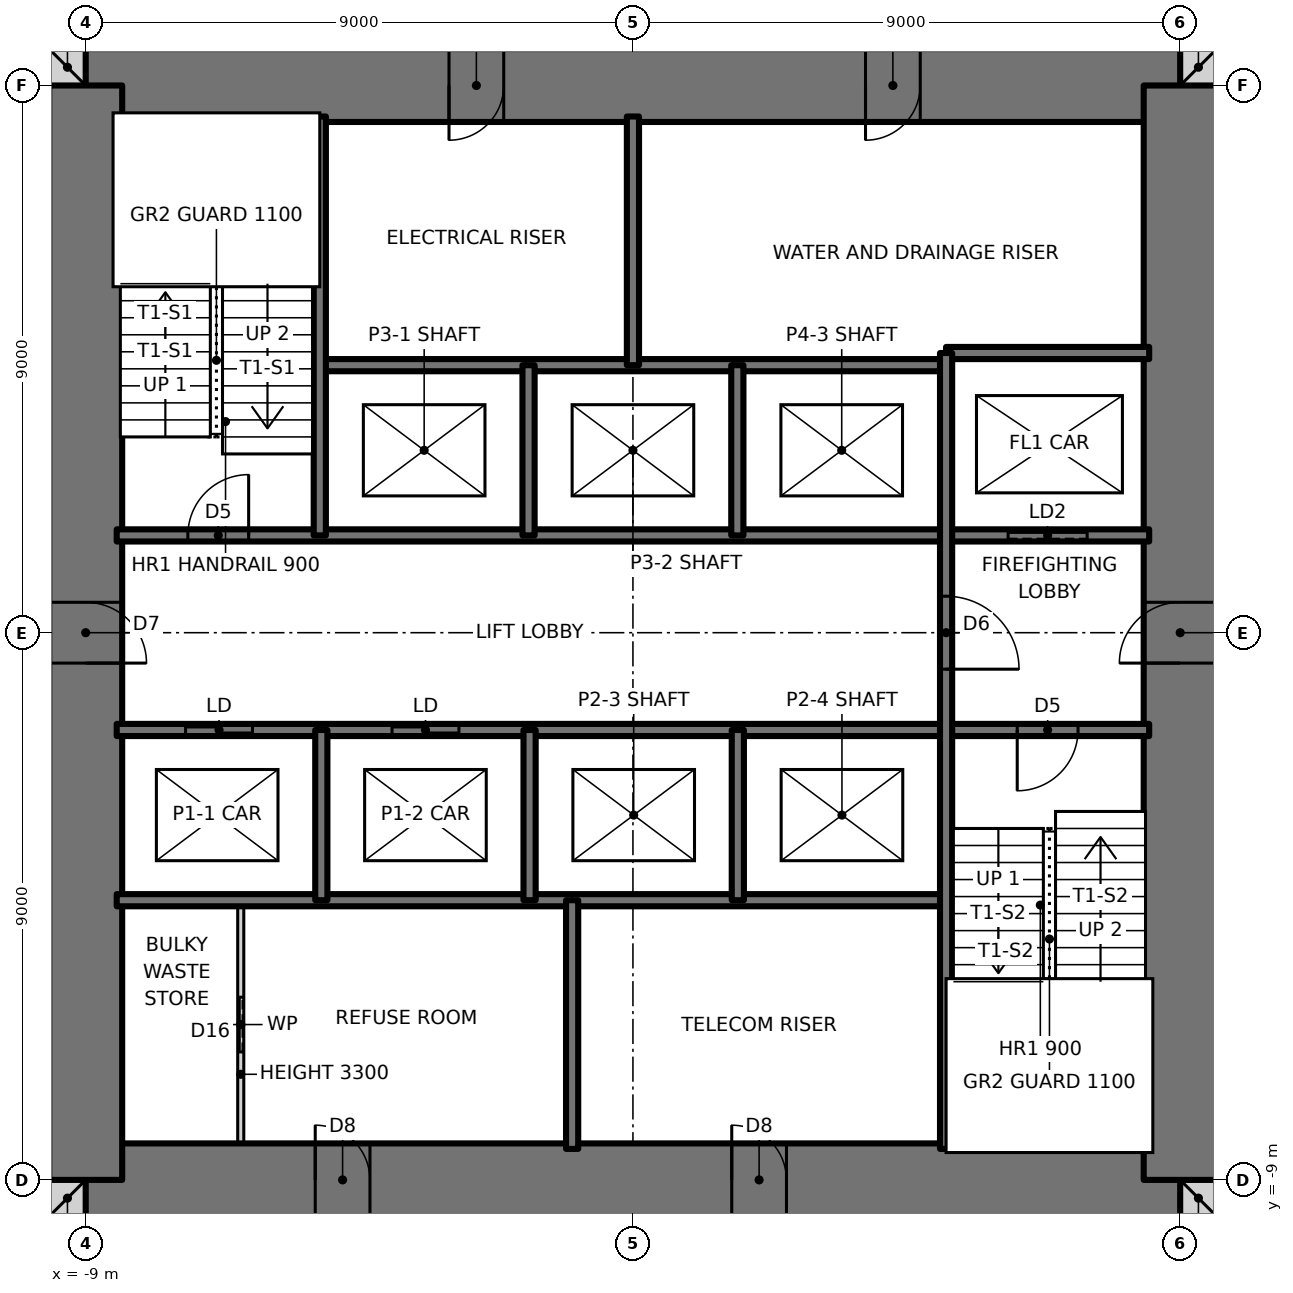
"""IFC4 building model, lengths in metres.
Left out: names, types, materials, properties, quantities, classifications, styles, units other than length and angle.
Written with IfcOpenShell. Run it as: python <this file> out.ifc"""

import sys

from ifc_helpers import new_model, si_unit, direction, frame, frame_2d, origin, place, context, subcontext, project, spatial, rectangle, extrude, element, fill, save


model = new_model("IFC4")
c1 = context("Model", 3, precision=1e-05, world=origin(), true_north=direction((0.0, 1.0)))
c2 = subcontext(c1, "Body", "Model", "MODEL_VIEW")
j1 = project(units=[si_unit("LENGTHUNIT", "METRE"), si_unit("PLANEANGLEUNIT", "RADIAN")], contexts=[c1])
p1 = place(None, origin())
s1 = spatial("IfcSite", under=j1, at=p1, CompositionType="ELEMENT")
p2 = place(p1, origin())
s2 = spatial("IfcBuilding", under=s1, at=p2, CompositionType="ELEMENT")
p3 = place(p2, frame((0.0, 0.0, 71.0)))
s3 = spatial("IfcBuildingStorey", under=s2, at=p3, CompositionType="ELEMENT", Elevation=71.0)
for number, where, z_axis, x_axis in (
    (1, (-9.6, -9.3, 0.0), (0.0, 0.0, 1.0), (1.0, 0.0, 0.0)),
    (2, (9.0, -9.3, 0.0), (0.0, 0.0, 1.0), (1.0, 0.0, 0.0)),
    (3, (9.0, 9.3, 0.0), (0.0, 0.0, 1.0), (1.0, 0.0, 0.0)),
    (4, (-9.6, 9.3, 0.0), (0.0, 0.0, 1.0), (1.0, 0.0, 0.0)),
):
    element("IfcWall", number, at=place(p3, frame(where, z_axis=z_axis, x_axis=x_axis)), inside=s3, PredefinedType="SOLIDWALL", context=c2, shape_type="SweptSolid", body=[
        extrude(rectangle(XDim=0.6, YDim=0.6, at=frame_2d((0.3, 0.0))), origin(), (0.0, 0.0, 1.0), 3.5),
    ])
p4 = place(p3, frame((-9.0, -9.0, 0.0), z_axis=(0.0, 0.0, 1.0), x_axis=(1.0, 0.0, 0.0)))
e5 = element("IfcWall", 5, at=p4, inside=s3, PredefinedType="SHEAR", context=c2, shape_type="SweptSolid", body=[
    extrude(rectangle(XDim=18.0, YDim=1.2, at=frame_2d((9.0, 0.0))), origin(), (0.0, 0.0, 1.0), 3.5),
])
p5 = place(p4, frame((3.775, 0.0, 0.0)))
e6 = element("IfcOpeningElement", 6, at=p5, cuts=e5, PredefinedType="OPENING", context=c2, shape_type="SweptSolid", body=[
    extrude(rectangle(XDim=0.9, YDim=2.1, at=frame_2d((0.45, 1.05))), frame((0.0, 0.61, 0.0), z_axis=(0.0, -1.0, 0.0), x_axis=(1.0, 0.0, 0.0)), (0.0, 0.0, 1.0), 1.22),
])
p6 = place(p4, frame((10.625, 0.0, 0.0)))
e7 = element("IfcOpeningElement", 7, at=p6, cuts=e5, PredefinedType="OPENING", context=c2, shape_type="SweptSolid", body=[
    extrude(rectangle(XDim=0.9, YDim=2.1, at=frame_2d((0.45, 1.05))), frame((0.0, 0.61, 0.0), z_axis=(0.0, -1.0, 0.0), x_axis=(1.0, 0.0, 0.0)), (0.0, 0.0, 1.0), 1.22),
])
p7 = place(p3, frame((9.0, 9.0, 0.0), z_axis=(0.0, 0.0, 1.0), x_axis=(-1.0, 0.0, 0.0)))
e8 = element("IfcWall", 8, at=p7, inside=s3, PredefinedType="SHEAR", context=c2, shape_type="SweptSolid", body=[
    extrude(rectangle(XDim=18.0, YDim=1.2, at=frame_2d((9.0, 0.0))), origin(), (0.0, 0.0, 1.0), 3.5),
])
p8 = place(p7, frame((11.125, 0.0, 0.0)))
e9 = element("IfcOpeningElement", 9, at=p8, cuts=e8, PredefinedType="OPENING", context=c2, shape_type="SweptSolid", body=[
    extrude(rectangle(XDim=0.9, YDim=2.1, at=frame_2d((0.45, 1.05))), frame((0.0, 0.61, 0.0), z_axis=(0.0, -1.0, 0.0), x_axis=(1.0, 0.0, 0.0)), (0.0, 0.0, 1.0), 1.22),
])
p9 = place(p7, frame((4.275, 0.0, 0.0)))
e10 = element("IfcOpeningElement", 10, at=p9, cuts=e8, PredefinedType="OPENING", context=c2, shape_type="SweptSolid", body=[
    extrude(rectangle(XDim=0.9, YDim=2.1, at=frame_2d((0.45, 1.05))), frame((0.0, 0.61, 0.0), z_axis=(0.0, -1.0, 0.0), x_axis=(1.0, 0.0, 0.0)), (0.0, 0.0, 1.0), 1.22),
])
p10 = place(p3, frame((9.0, -9.0, 0.0), z_axis=(0.0, 0.0, 1.0), x_axis=(0.0, 1.0, 0.0)))
e11 = element("IfcWall", 11, at=p10, inside=s3, PredefinedType="SHEAR", context=c2, shape_type="SweptSolid", body=[
    extrude(rectangle(XDim=18.0, YDim=1.2, at=frame_2d((9.0, 0.0))), origin(), (0.0, 0.0, 1.0), 3.5),
])
p11 = place(p10, frame((8.5, 0.0, 0.0)))
e12 = element("IfcOpeningElement", 12, at=p11, cuts=e11, PredefinedType="OPENING", context=c2, shape_type="SweptSolid", body=[
    extrude(rectangle(XDim=1.0, YDim=2.1, at=frame_2d((0.5, 1.05))), frame((0.0, 0.61, 0.0), z_axis=(0.0, -1.0, 0.0), x_axis=(1.0, 0.0, 0.0)), (0.0, 0.0, 1.0), 1.22),
])
p12 = place(p3, frame((-9.0, 9.0, 0.0), z_axis=(0.0, 0.0, 1.0), x_axis=(0.0, -1.0, 0.0)))
e13 = element("IfcWall", 13, at=p12, inside=s3, PredefinedType="SHEAR", context=c2, shape_type="SweptSolid", body=[
    extrude(rectangle(XDim=18.0, YDim=1.2, at=frame_2d((9.0, 0.0))), origin(), (0.0, 0.0, 1.0), 3.5),
])
p13 = place(p12, frame((8.5, 0.0, 0.0)))
e14 = element("IfcOpeningElement", 14, at=p13, cuts=e13, PredefinedType="OPENING", context=c2, shape_type="SweptSolid", body=[
    extrude(rectangle(XDim=1.0, YDim=2.1, at=frame_2d((0.5, 1.05))), frame((0.0, 0.61, 0.0), z_axis=(0.0, -1.0, 0.0), x_axis=(1.0, 0.0, 0.0)), (0.0, 0.0, 1.0), 1.22),
])
p14 = place(p3, frame((-8.49, -4.4, 0.0), z_axis=(0.0, 0.0, 1.0), x_axis=(1.0, 0.0, 0.0)))
e15 = element("IfcWall", 15, at=p14, inside=s3, PredefinedType="SOLIDWALL", context=c2, shape_type="SweptSolid", body=[
    extrude(rectangle(XDim=13.64, YDim=0.2, at=frame_2d((6.82, 0.0))), origin(), (0.0, 0.0, 1.0), 3.5),
])
p15 = place(p3, frame((-8.49, -1.6, 0.0), z_axis=(0.0, 0.0, 1.0), x_axis=(1.0, 0.0, 0.0)))
e16 = element("IfcWall", 16, at=p15, inside=s3, PredefinedType="SOLIDWALL", context=c2, shape_type="SweptSolid", body=[
    extrude(rectangle(XDim=16.98, YDim=0.2, at=frame_2d((8.49, 0.0))), origin(), (0.0, 0.0, 1.0), 3.5),
])
p16 = place(p15, frame((14.81, 0.0, 0.0)))
e17 = element("IfcOpeningElement", 17, at=p16, cuts=e16, PredefinedType="OPENING", context=c2, shape_type="SweptSolid", body=[
    extrude(rectangle(XDim=1.0, YDim=2.1, at=frame_2d((0.5, 1.05))), frame((0.0, 0.11, 0.0), z_axis=(0.0, -1.0, 0.0), x_axis=(1.0, 0.0, 0.0)), (0.0, 0.0, 1.0), 0.22),
])
p17 = place(p15, frame((1.133, 0.0, 0.0)))
e18 = element("IfcOpeningElement", 18, at=p17, cuts=e16, PredefinedType="OPENING", context=c2, shape_type="SweptSolid", body=[
    extrude(rectangle(XDim=1.1, YDim=2.1, at=frame_2d((0.55, 1.05))), frame((0.0, 0.11, 0.0), z_axis=(0.0, -1.0, 0.0), x_axis=(1.0, 0.0, 0.0)), (0.0, 0.0, 1.0), 0.22),
])
p18 = place(p15, frame((4.528, 0.0, 0.0)))
e19 = element("IfcOpeningElement", 19, at=p18, cuts=e16, PredefinedType="OPENING", context=c2, shape_type="SweptSolid", body=[
    extrude(rectangle(XDim=1.1, YDim=2.1, at=frame_2d((0.55, 1.05))), frame((0.0, 0.11, 0.0), z_axis=(0.0, -1.0, 0.0), x_axis=(1.0, 0.0, 0.0)), (0.0, 0.0, 1.0), 0.22),
])
p19 = place(p3, frame((-8.49, 1.6, 0.0), z_axis=(0.0, 0.0, 1.0), x_axis=(1.0, 0.0, 0.0)))
e20 = element("IfcWall", 20, at=p19, inside=s3, PredefinedType="SOLIDWALL", context=c2, shape_type="SweptSolid", body=[
    extrude(rectangle(XDim=16.98, YDim=0.2, at=frame_2d((8.49, 0.0))), origin(), (0.0, 0.0, 1.0), 3.5),
])
p20 = place(p19, frame((1.17, 0.0, 0.0)))
e21 = element("IfcOpeningElement", 21, at=p20, cuts=e20, PredefinedType="OPENING", context=c2, shape_type="SweptSolid", body=[
    extrude(rectangle(XDim=1.0, YDim=2.1, at=frame_2d((0.5, 1.05))), frame((0.0, 0.11, 0.0), z_axis=(0.0, -1.0, 0.0), x_axis=(1.0, 0.0, 0.0)), (0.0, 0.0, 1.0), 0.22),
])
p21 = place(p19, frame((14.66, 0.0, 0.0)))
e22 = element("IfcOpeningElement", 22, at=p21, cuts=e20, PredefinedType="OPENING", context=c2, shape_type="SweptSolid", body=[
    extrude(rectangle(XDim=1.3, YDim=2.1, at=frame_2d((0.65, 1.05))), frame((0.0, 0.11, 0.0), z_axis=(0.0, -1.0, 0.0), x_axis=(1.0, 0.0, 0.0)), (0.0, 0.0, 1.0), 0.22),
])
p22 = place(p3, frame((-5.15, 4.4, 0.0), z_axis=(0.0, 0.0, 1.0), x_axis=(1.0, 0.0, 0.0)))
e23 = element("IfcWall", 23, at=p22, inside=s3, PredefinedType="SOLIDWALL", context=c2, shape_type="SweptSolid", body=[
    extrude(rectangle(XDim=10.3, YDim=0.2, at=frame_2d((5.15, 0.0))), origin(), (0.0, 0.0, 1.0), 3.5),
])
p23 = place(p3, frame((5.15, 4.6, 0.0), z_axis=(0.0, 0.0, 1.0), x_axis=(1.0, 0.0, 0.0)))
e24 = element("IfcWall", 24, at=p23, inside=s3, PredefinedType="SOLIDWALL", context=c2, shape_type="SweptSolid", body=[
    extrude(rectangle(XDim=3.34, YDim=0.2, at=frame_2d((1.67, 0.0))), origin(), (0.0, 0.0, 1.0), 3.5),
])
p24 = place(p3, frame((5.15, -8.49, 0.0), z_axis=(0.0, 0.0, 1.0), x_axis=(0.0, 1.0, 0.0)))
e25 = element("IfcWall", 25, at=p24, inside=s3, PredefinedType="SOLIDWALL", context=c2, shape_type="SweptSolid", body=[
    extrude(rectangle(XDim=13.09, YDim=0.2, at=frame_2d((6.545, 0.0))), origin(), (0.0, 0.0, 1.0), 3.5),
])
p25 = place(p24, frame((7.89, 0.0, 0.0)))
e26 = element("IfcOpeningElement", 26, at=p25, cuts=e25, PredefinedType="OPENING", context=c2, shape_type="SweptSolid", body=[
    extrude(rectangle(XDim=1.2, YDim=2.1, at=frame_2d((0.6, 1.05))), frame((0.0, 0.11, 0.0), z_axis=(0.0, -1.0, 0.0), x_axis=(1.0, 0.0, 0.0)), (0.0, 0.0, 1.0), 0.22),
])
for number, where, z_axis, x_axis in (
    (27, (1.725, -4.4, 0.0), (0.0, 0.0, 1.0), (0.0, 1.0, 0.0)),
    (28, (1.717, 1.6, 0.0), (0.0, 0.0, 1.0), (0.0, 1.0, 0.0)),
):
    element("IfcWall", number, at=place(p3, frame(where, z_axis=z_axis, x_axis=x_axis)), inside=s3, PredefinedType="SOLIDWALL", context=c2, shape_type="SweptSolid", body=[
        extrude(rectangle(XDim=2.8, YDim=0.2, at=frame_2d((1.4, 0.0))), origin(), (0.0, 0.0, 1.0), 3.5),
    ])
for number, where, z_axis, x_axis in (
    (29, (0.0, 4.4, 0.0), (0.0, 0.0, 1.0), (0.0, 1.0, 0.0)),
    (30, (-1.0, -8.49, 0.0), (0.0, 0.0, 1.0), (0.0, 1.0, 0.0)),
):
    element("IfcWall", number, at=place(p3, frame(where, z_axis=z_axis, x_axis=x_axis)), inside=s3, PredefinedType="SOLIDWALL", context=c2, shape_type="SweptSolid", body=[
        extrude(rectangle(XDim=4.09, YDim=0.2, at=frame_2d((2.045, 0.0))), origin(), (0.0, 0.0, 1.0), 3.5),
    ])
for number, where, z_axis, x_axis in (
    (31, (-1.7, -4.4, 0.0), (0.0, 0.0, 1.0), (0.0, 1.0, 0.0)),
    (32, (-1.717, 1.6, 0.0), (0.0, 0.0, 1.0), (0.0, 1.0, 0.0)),
    (33, (-5.125, -4.4, 0.0), (0.0, 0.0, 1.0), (0.0, 1.0, 0.0)),
):
    element("IfcWall", number, at=place(p3, frame(where, z_axis=z_axis, x_axis=x_axis)), inside=s3, PredefinedType="SOLIDWALL", context=c2, shape_type="SweptSolid", body=[
        extrude(rectangle(XDim=2.8, YDim=0.2, at=frame_2d((1.4, 0.0))), origin(), (0.0, 0.0, 1.0), 3.5),
    ])
p26 = place(p3, frame((-5.15, 1.6, 0.0), z_axis=(0.0, 0.0, 1.0), x_axis=(0.0, 1.0, 0.0)))
e34 = element("IfcWall", 34, at=p26, inside=s3, PredefinedType="SOLIDWALL", context=c2, shape_type="SweptSolid", body=[
    extrude(rectangle(XDim=6.89, YDim=0.2, at=frame_2d((3.445, 0.0))), origin(), (0.0, 0.0, 1.0), 3.5),
])
p27 = place(p3, frame((-6.45, -8.49, 0.0), z_axis=(0.0, 0.0, 1.0), x_axis=(0.0, 1.0, 0.0)))
e35 = element("IfcWall", 35, at=p27, inside=s3, PredefinedType="PARTITIONING", context=c2, shape_type="SweptSolid", body=[
    extrude(rectangle(XDim=4.09, YDim=0.1, at=frame_2d((2.045, 0.0))), origin(), (0.0, 0.0, 1.0), 3.3),
])
p28 = place(p27, frame((1.595, 0.0, 0.0)))
e36 = element("IfcOpeningElement", 36, at=p28, cuts=e35, PredefinedType="OPENING", context=c2, shape_type="SweptSolid", body=[
    extrude(rectangle(XDim=0.9, YDim=2.1, at=frame_2d((0.45, 1.05))), frame((0.0, 0.06, 0.0), z_axis=(0.0, -1.0, 0.0), x_axis=(1.0, 0.0, 0.0)), (0.0, 0.0, 1.0), 0.12),
])
p29 = place(p20, origin())
e37 = element("IfcDoor", 37, at=p29, inside=s3, OperationType="SINGLE_SWING_RIGHT", PredefinedType="DOOR", context=c2, shape_type="SweptSolid", body=[
    extrude(rectangle(XDim=1.0, YDim=2.1, at=frame_2d((0.5, 1.05))), frame((0.0, 0.025, 0.0), z_axis=(0.0, -1.0, 0.0), x_axis=(1.0, 0.0, 0.0)), (0.0, 0.0, 1.0), 0.05),
])
fill(e21, e37)
p30 = place(p16, frame((1.0, 0.0, 0.0), z_axis=(0.0, 0.0, 1.0), x_axis=(-1.0, 0.0, 0.0)))
e38 = element("IfcDoor", 38, at=p30, inside=s3, OperationType="SINGLE_SWING_RIGHT", PredefinedType="DOOR", context=c2, shape_type="SweptSolid", body=[
    extrude(rectangle(XDim=1.0, YDim=2.1, at=frame_2d((0.5, 1.05))), frame((0.0, 0.025, 0.0), z_axis=(0.0, -1.0, 0.0), x_axis=(1.0, 0.0, 0.0)), (0.0, 0.0, 1.0), 0.05),
])
fill(e17, e38)
p31 = place(p25, frame((1.2, 0.0, 0.0), z_axis=(0.0, 0.0, 1.0), x_axis=(-1.0, 0.0, 0.0)))
e39 = element("IfcDoor", 39, at=p31, inside=s3, OperationType="SINGLE_SWING_RIGHT", PredefinedType="DOOR", context=c2, shape_type="SweptSolid", body=[
    extrude(rectangle(XDim=1.2, YDim=2.1, at=frame_2d((0.6, 1.05))), frame((0.0, 0.025, 0.0), z_axis=(0.0, -1.0, 0.0), x_axis=(1.0, 0.0, 0.0)), (0.0, 0.0, 1.0), 0.05),
])
fill(e26, e39)
p32 = place(p28, origin())
e40 = element("IfcDoor", 40, at=p32, inside=s3, OperationType="SLIDING_TO_LEFT", PredefinedType="DOOR", context=c2, shape_type="SweptSolid", body=[
    extrude(rectangle(XDim=0.9, YDim=2.1, at=frame_2d((0.45, 1.05))), frame((0.0, 0.025, 0.0), z_axis=(0.0, -1.0, 0.0), x_axis=(1.0, 0.0, 0.0)), (0.0, 0.0, 1.0), 0.05),
])
fill(e36, e40)
p33 = place(p13, origin())
e41 = element("IfcDoor", 41, at=p33, inside=s3, OperationType="SINGLE_SWING_RIGHT", PredefinedType="DOOR", context=c2, shape_type="SweptSolid", body=[
    extrude(rectangle(XDim=1.0, YDim=2.1, at=frame_2d((0.5, 1.05))), frame((0.0, 0.025, 0.0), z_axis=(0.0, -1.0, 0.0), x_axis=(1.0, 0.0, 0.0)), (0.0, 0.0, 1.0), 0.05),
])
fill(e14, e41)
p34 = place(p11, origin())
e42 = element("IfcDoor", 42, at=p34, inside=s3, OperationType="SINGLE_SWING_LEFT", PredefinedType="DOOR", context=c2, shape_type="SweptSolid", body=[
    extrude(rectangle(XDim=1.0, YDim=2.1, at=frame_2d((0.5, 1.05))), frame((0.0, 0.025, 0.0), z_axis=(0.0, -1.0, 0.0), x_axis=(1.0, 0.0, 0.0)), (0.0, 0.0, 1.0), 0.05),
])
fill(e12, e42)
p35 = place(p8, origin())
e43 = element("IfcDoor", 43, at=p35, inside=s3, OperationType="SINGLE_SWING_RIGHT", PredefinedType="DOOR", context=c2, shape_type="SweptSolid", body=[
    extrude(rectangle(XDim=0.9, YDim=2.1, at=frame_2d((0.45, 1.05))), frame((0.0, 0.025, 0.0), z_axis=(0.0, -1.0, 0.0), x_axis=(1.0, 0.0, 0.0)), (0.0, 0.0, 1.0), 0.05),
])
fill(e9, e43)
p36 = place(p9, origin())
e44 = element("IfcDoor", 44, at=p36, inside=s3, OperationType="SINGLE_SWING_RIGHT", PredefinedType="DOOR", context=c2, shape_type="SweptSolid", body=[
    extrude(rectangle(XDim=0.9, YDim=2.1, at=frame_2d((0.45, 1.05))), frame((0.0, 0.025, 0.0), z_axis=(0.0, -1.0, 0.0), x_axis=(1.0, 0.0, 0.0)), (0.0, 0.0, 1.0), 0.05),
])
fill(e10, e44)
p37 = place(p5, origin())
e45 = element("IfcDoor", 45, at=p37, inside=s3, OperationType="SINGLE_SWING_LEFT", PredefinedType="DOOR", context=c2, shape_type="SweptSolid", body=[
    extrude(rectangle(XDim=0.9, YDim=2.1, at=frame_2d((0.45, 1.05))), frame((0.0, 0.025, 0.0), z_axis=(0.0, -1.0, 0.0), x_axis=(1.0, 0.0, 0.0)), (0.0, 0.0, 1.0), 0.05),
])
fill(e6, e45)
p38 = place(p6, origin())
e46 = element("IfcDoor", 46, at=p38, inside=s3, OperationType="SINGLE_SWING_LEFT", PredefinedType="DOOR", context=c2, shape_type="SweptSolid", body=[
    extrude(rectangle(XDim=0.9, YDim=2.1, at=frame_2d((0.45, 1.05))), frame((0.0, 0.025, 0.0), z_axis=(0.0, -1.0, 0.0), x_axis=(1.0, 0.0, 0.0)), (0.0, 0.0, 1.0), 0.05),
])
fill(e7, e46)
p39 = place(p17, origin())
e47 = element("IfcDoor", 47, at=p39, inside=s3, OperationType="DOUBLE_DOOR_SLIDING", PredefinedType="DOOR", context=c2, shape_type="SweptSolid", body=[
    extrude(rectangle(XDim=1.1, YDim=2.1, at=frame_2d((0.55, 1.05))), frame((0.0, 0.025, 0.0), z_axis=(0.0, -1.0, 0.0), x_axis=(1.0, 0.0, 0.0)), (0.0, 0.0, 1.0), 0.05),
])
fill(e18, e47)
p40 = place(p18, origin())
e48 = element("IfcDoor", 48, at=p40, inside=s3, OperationType="DOUBLE_DOOR_SLIDING", PredefinedType="DOOR", context=c2, shape_type="SweptSolid", body=[
    extrude(rectangle(XDim=1.1, YDim=2.1, at=frame_2d((0.55, 1.05))), frame((0.0, 0.025, 0.0), z_axis=(0.0, -1.0, 0.0), x_axis=(1.0, 0.0, 0.0)), (0.0, 0.0, 1.0), 0.05),
])
fill(e19, e48)
p41 = place(p21, origin())
e49 = element("IfcDoor", 49, at=p41, inside=s3, OperationType="SLIDING_TO_LEFT", PredefinedType="DOOR", context=c2, shape_type="SweptSolid", body=[
    extrude(rectangle(XDim=1.3, YDim=2.1, at=frame_2d((0.65, 1.05))), frame((0.0, 0.025, 0.0), z_axis=(0.0, -1.0, 0.0), x_axis=(1.0, 0.0, 0.0)), (0.0, 0.0, 1.0), 0.05),
])
fill(e22, e49)
save(model, sys.argv[1])
